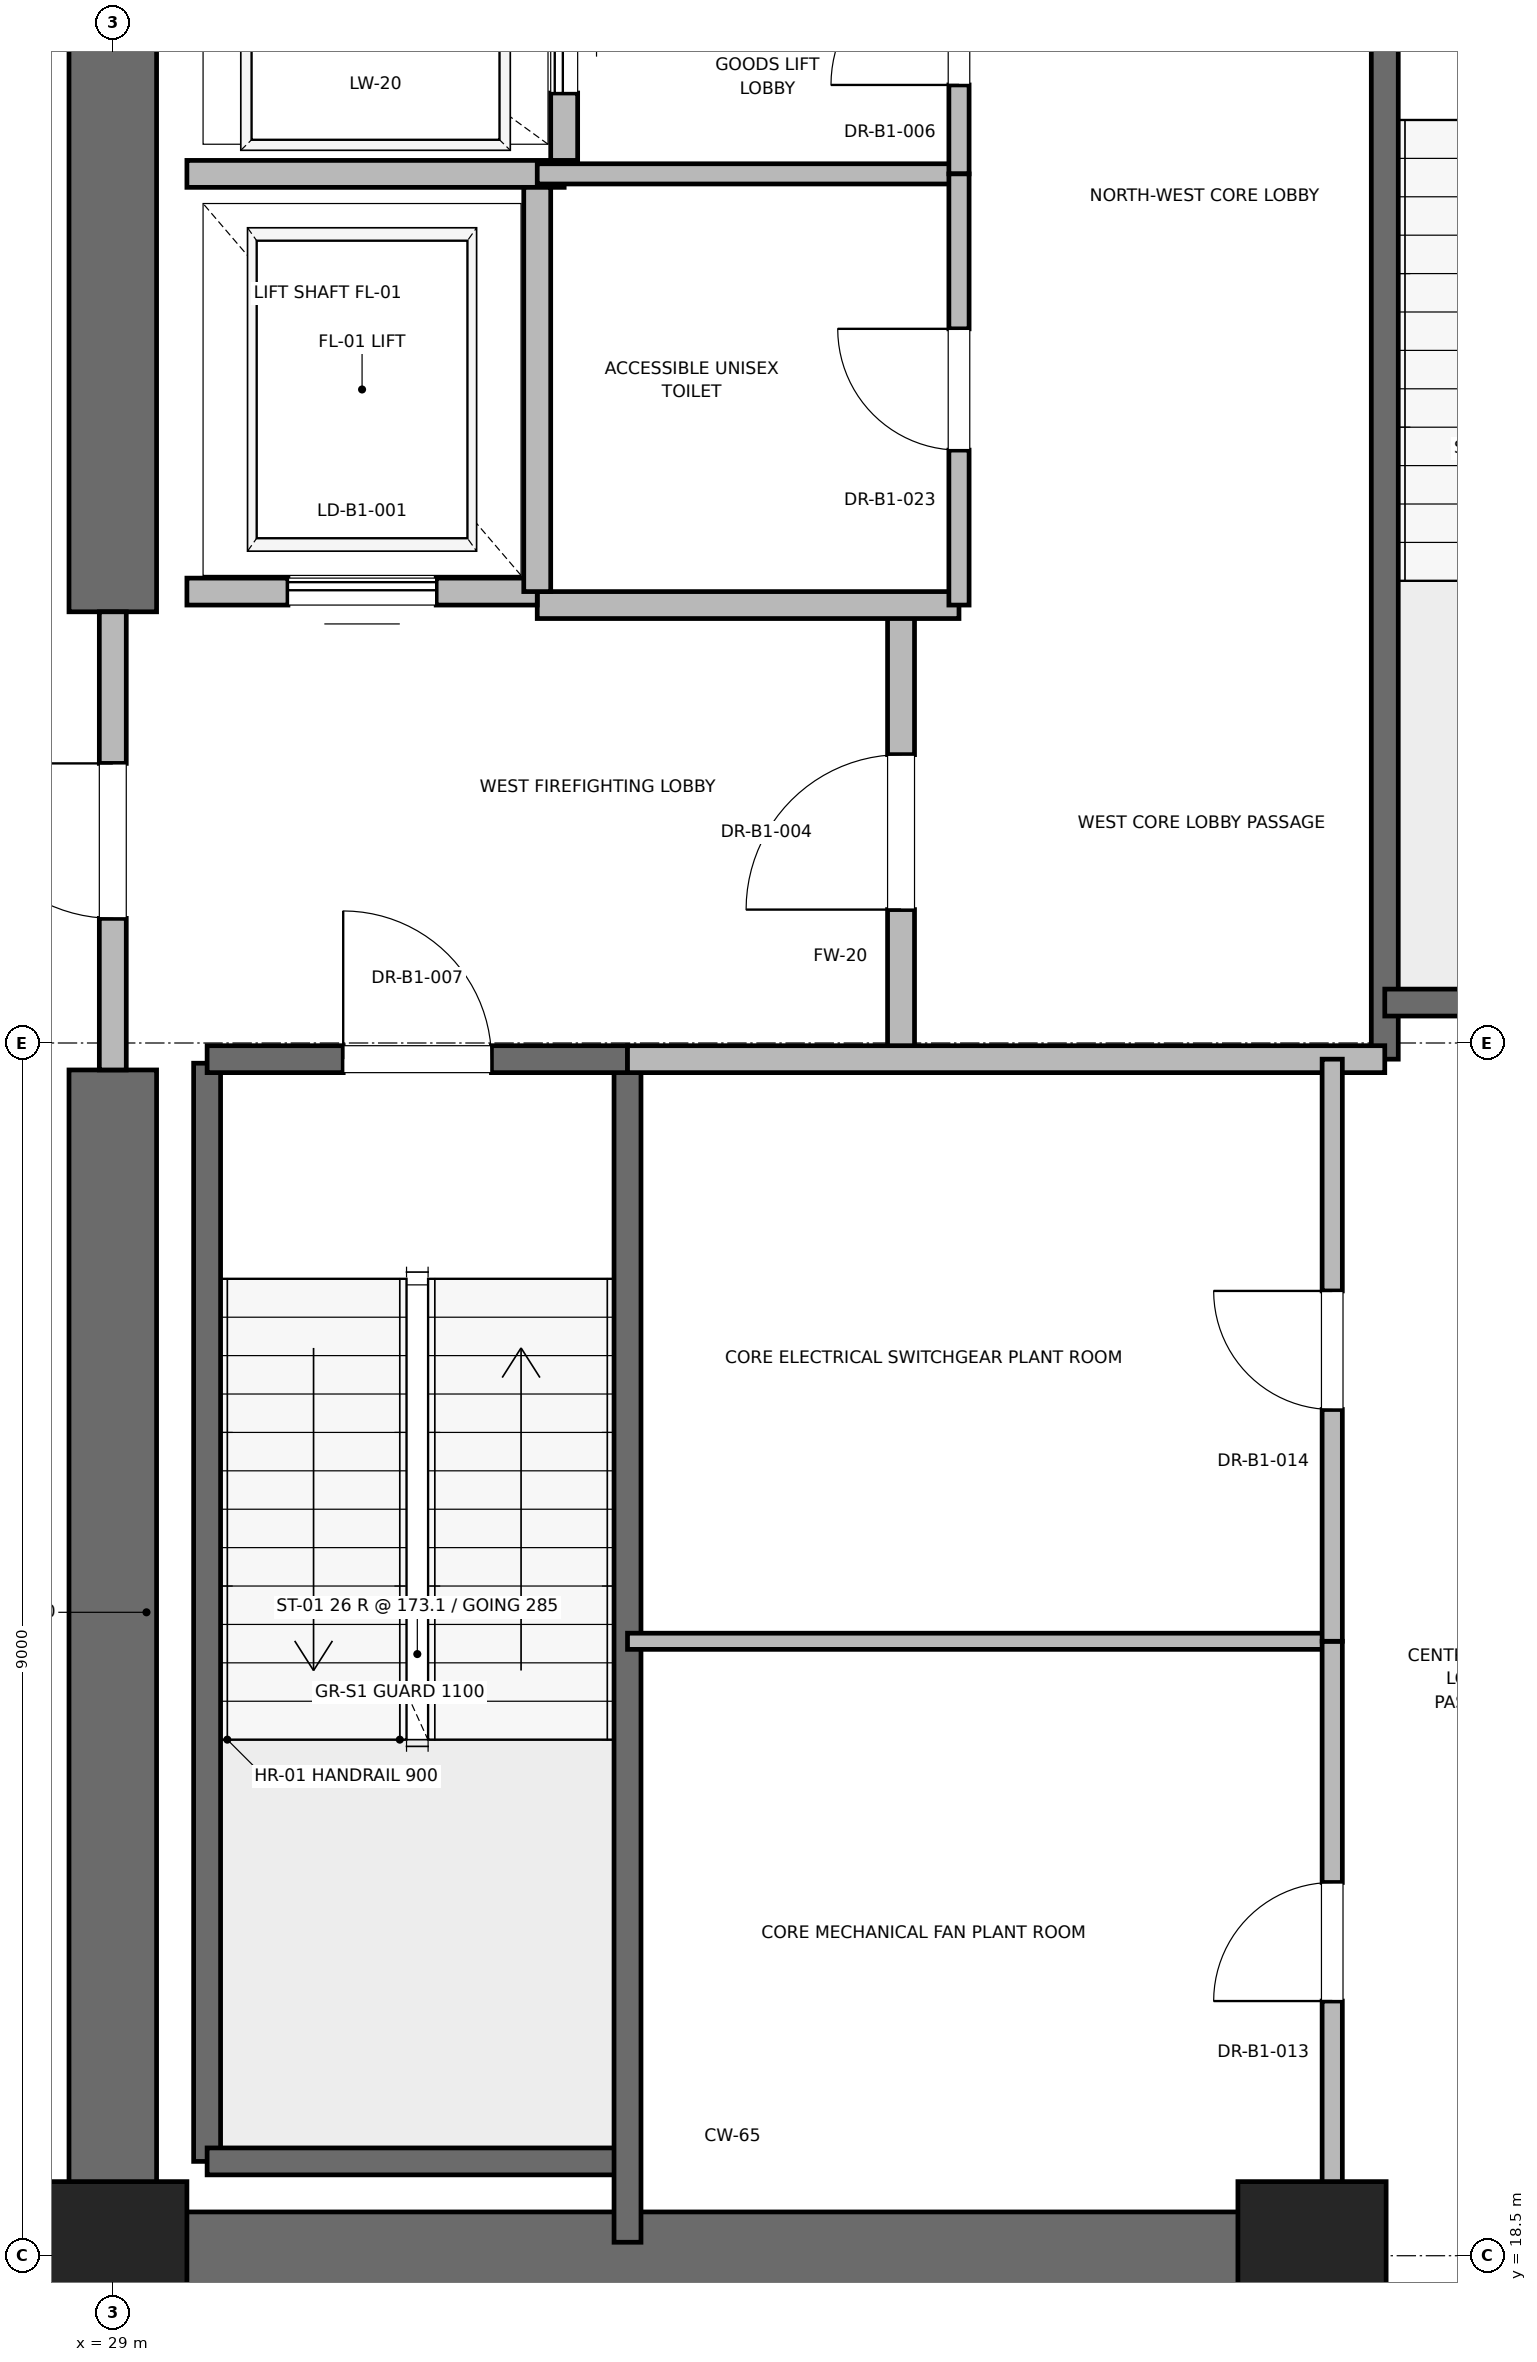
"""IFC4 building model, lengths in metres.
Left out: names, types, materials, properties, quantities, classifications, styles, units other than length and angle.
Written with IfcOpenShell. Run it as: python <this file> out.ifc"""

import sys

from ifc_helpers import new_model, si_unit, direction, frame, frame_2d, origin, origin_2d, place, context, subcontext, project, spatial, rectangle, extrude, element, fill, save


model = new_model("IFC4")
c1 = context("Model", 3, precision=1e-05, world=origin(), true_north=direction((0.0, 1.0)))
c2 = subcontext(c1, "Body", "Model", "MODEL_VIEW")
j1 = project(units=[si_unit("LENGTHUNIT", "METRE"), si_unit("PLANEANGLEUNIT", "RADIAN")], contexts=[c1])
p1 = place(None, origin())
s1 = spatial("IfcSite", under=j1, at=p1, CompositionType="ELEMENT")
p2 = place(p1, origin())
s2 = spatial("IfcBuilding", under=s1, at=p2, CompositionType="ELEMENT")
p3 = place(p2, frame((0.0, 0.0, -4.5)))
s3 = spatial("IfcBuildingStorey", under=s2, at=p3, CompositionType="ELEMENT", Elevation=-4.5)
for number, where, z_axis, x_axis in (
    (1, (29.0, 18.5, 0.0), (0.0, 0.0, 1.0), (1.0, 0.0, 0.0)),
    (2, (37.9, 18.5, 0.0), (0.0, 0.0, 1.0), (1.0, 0.0, 0.0)),
):
    element("IfcColumn", number, at=place(p3, frame(where, z_axis=z_axis, x_axis=x_axis)), inside=s3, PredefinedType="PILASTER", context=c2, shape_type="SweptSolid", body=[
        extrude(rectangle(XDim=1.1, YDim=1.1, at=origin_2d()), origin(), (0.0, 0.0, 1.0), 4.5),
    ])
p4 = place(p3, frame((29.0, 18.5, 0.0), z_axis=(0.0, 0.0, 1.0), x_axis=(1.0, 0.0, 0.0)))
e3 = element("IfcWall", 3, at=p4, inside=s3, PredefinedType="SHEAR", context=c2, shape_type="SweptSolid", body=[
    extrude(rectangle(XDim=9.2, YDim=0.65, at=frame_2d((4.6, 0.0))), origin(), (0.0, 0.0, 1.0), 4.22),
])
p5 = place(p3, frame((29.0, 18.5, 0.0), z_axis=(0.0, 0.0, 1.0), x_axis=(0.0, 1.0, 0.0)))
e4 = element("IfcWall", 4, at=p5, inside=s3, PredefinedType="SHEAR", context=c2, shape_type="SweptSolid", body=[
    extrude(rectangle(XDim=8.8, YDim=0.65, at=frame_2d((4.4, 0.0))), origin(), (0.0, 0.0, 1.0), 4.22),
])
p6 = place(p3, frame((29.0, 30.7, 0.0), z_axis=(0.0, 0.0, 1.0), x_axis=(0.0, 1.0, 0.0)))
e5 = element("IfcWall", 5, at=p6, inside=s3, PredefinedType="SHEAR", context=c2, shape_type="SweptSolid", body=[
    extrude(rectangle(XDim=5.8, YDim=0.65, at=frame_2d((2.9, 0.0))), origin(), (0.0, 0.0, 1.0), 4.22),
])
p7 = place(p3, frame((29.7, 19.2, 0.0), z_axis=(0.0, 0.0, 1.0), x_axis=(0.0, 1.0, 0.0)))
e6 = element("IfcWall", 6, at=p7, inside=s3, PredefinedType="SOLIDWALL", context=c2, shape_type="SweptSolid", body=[
    extrude(rectangle(XDim=8.15, YDim=0.2, at=frame_2d((4.075, 0.0))), origin(), (0.0, 0.0, 1.0), 4.22),
])
p8 = place(p3, frame((29.7, 19.2, 0.0), z_axis=(0.0, 0.0, 1.0), x_axis=(1.0, 0.0, 0.0)))
e7 = element("IfcWall", 7, at=p8, inside=s3, PredefinedType="SOLIDWALL", context=c2, shape_type="SweptSolid", body=[
    extrude(rectangle(XDim=3.12, YDim=0.2, at=frame_2d((1.56, 0.0))), origin(), (0.0, 0.0, 1.0), 4.22),
])
p9 = place(p3, frame((32.82, 18.6, 0.0), z_axis=(0.0, 0.0, 1.0), x_axis=(0.0, 1.0, 0.0)))
e8 = element("IfcWall", 8, at=p9, inside=s3, PredefinedType="SOLIDWALL", context=c2, shape_type="SweptSolid", body=[
    extrude(rectangle(XDim=8.78, YDim=0.2, at=frame_2d((4.39, 0.0))), origin(), (0.0, 0.0, 1.0), 4.22),
])
p10 = place(p3, frame((29.7, 27.38, 0.0), z_axis=(0.0, 0.0, 1.0), x_axis=(1.0, 0.0, 0.0)))
e9 = element("IfcWall", 9, at=p10, inside=s3, PredefinedType="SOLIDWALL", context=c2, shape_type="SweptSolid", body=[
    extrude(rectangle(XDim=3.12, YDim=0.2, at=frame_2d((1.56, 0.0))), origin(), (0.0, 0.0, 1.0), 4.22),
])
p11 = place(p10, frame((1.01, 0.0, 0.0)))
e10 = element("IfcOpeningElement", 10, at=p11, cuts=e9, PredefinedType="OPENING", context=c2, shape_type="SweptSolid", body=[
    extrude(rectangle(XDim=1.1, YDim=2.15, at=frame_2d((0.55, 1.075))), frame((0.0, 0.1, 0.0), z_axis=(0.0, -1.0, 0.0), x_axis=(1.0, 0.0, 0.0)), (0.0, 0.0, 1.0), 0.2),
])
p12 = place(p3, frame((38.44, 27.38, 0.0), z_axis=(0.0, 0.0, 1.0), x_axis=(0.0, 1.0, 0.0)))
e11 = element("IfcWall", 11, at=p12, inside=s3, PredefinedType="SOLIDWALL", context=c2, shape_type="SweptSolid", body=[
    extrude(rectangle(XDim=8.87, YDim=0.2, at=frame_2d((4.435, 0.0))), origin(), (0.0, 0.0, 1.0), 4.22),
])
p13 = place(p3, frame((38.44, 27.8, 0.0), z_axis=(0.0, 0.0, 1.0), x_axis=(1.0, 0.0, 0.0)))
e12 = element("IfcWall", 12, at=p13, inside=s3, PredefinedType="SOLIDWALL", context=c2, shape_type="SweptSolid", body=[
    extrude(rectangle(XDim=3.32, YDim=0.2, at=frame_2d((1.66, 0.0))), origin(), (0.0, 0.0, 1.0), 4.22),
])
p14 = place(p3, frame((34.85, 27.38, 0.0), z_axis=(0.0, 0.0, 1.0), x_axis=(0.0, 1.0, 0.0)))
e13 = element("IfcWall", 13, at=p14, inside=s3, PredefinedType="PARTITIONING", context=c2, shape_type="SweptSolid", body=[
    extrude(rectangle(XDim=3.37, YDim=0.2, at=frame_2d((1.685, 0.0))), origin(), (0.0, 0.0, 1.0), 4.22),
])
p15 = place(p14, frame((1.11, 0.0, 0.0)))
e14 = element("IfcOpeningElement", 14, at=p15, cuts=e13, PredefinedType="OPENING", context=c2, shape_type="SweptSolid", body=[
    extrude(rectangle(XDim=1.15, YDim=2.2, at=frame_2d((0.575, 1.1))), frame((0.0, 0.1, 0.0), z_axis=(0.0, -1.0, 0.0), x_axis=(1.0, 0.0, 0.0)), (0.0, 0.0, 1.0), 0.2),
])
p16 = place(p3, frame((29.0, 27.3, 0.0), z_axis=(0.0, 0.0, 1.0), x_axis=(0.0, 1.0, 0.0)))
e15 = element("IfcWall", 15, at=p16, inside=s3, PredefinedType="PARTITIONING", context=c2, shape_type="SweptSolid", body=[
    extrude(rectangle(XDim=3.4, YDim=0.2, at=frame_2d((1.7, 0.0))), origin(), (0.0, 0.0, 1.0), 3.0),
])
p17 = place(p16, frame((1.125, 0.0, 0.0)))
e16 = element("IfcOpeningElement", 16, at=p17, cuts=e15, PredefinedType="OPENING", context=c2, shape_type="SweptSolid", body=[
    extrude(rectangle(XDim=1.15, YDim=2.2, at=frame_2d((0.575, 1.1))), frame((0.0, 0.1, 0.0), z_axis=(0.0, -1.0, 0.0), x_axis=(1.0, 0.0, 0.0)), (0.0, 0.0, 1.0), 0.2),
])
p18 = place(p3, frame((32.82, 27.38, 0.0), z_axis=(0.0, 0.0, 1.0), x_axis=(1.0, 0.0, 0.0)))
e17 = element("IfcWall", 17, at=p18, inside=s3, PredefinedType="PARTITIONING", context=c2, shape_type="SweptSolid", body=[
    extrude(rectangle(XDim=5.62, YDim=0.2, at=frame_2d((2.81, 0.0))), origin(), (0.0, 0.0, 1.0), 4.22),
])
p19 = place(p3, frame((32.15, 30.75, 0.0), z_axis=(0.0, 0.0, 1.0), x_axis=(1.0, 0.0, 0.0)))
e18 = element("IfcWall", 18, at=p19, inside=s3, PredefinedType="PARTITIONING", context=c2, shape_type="SweptSolid", body=[
    extrude(rectangle(XDim=3.13, YDim=0.2, at=frame_2d((1.565, 0.0))), origin(), (0.0, 0.0, 1.0), 4.22),
])
p20 = place(p3, frame((29.55, 30.85, 0.0), z_axis=(0.0, 0.0, 1.0), x_axis=(1.0, 0.0, 0.0)))
e19 = element("IfcWall", 19, at=p20, inside=s3, PredefinedType="SOLIDWALL", context=c2, shape_type="SweptSolid", body=[
    extrude(rectangle(XDim=2.6, YDim=0.2, at=frame_2d((1.3, 0.0))), origin(), (0.0, 0.0, 1.0), 3.0),
])
p21 = place(p20, frame((0.75, 0.0, 0.0)))
e20 = element("IfcOpeningElement", 20, at=p21, cuts=e19, PredefinedType="OPENING", context=c2, shape_type="SweptSolid", body=[
    extrude(rectangle(XDim=1.1, YDim=2.2, at=frame_2d((0.55, 1.1))), frame((0.0, 0.1, 0.0), z_axis=(0.0, -1.0, 0.0), x_axis=(1.0, 0.0, 0.0)), (0.0, 0.0, 1.0), 0.2),
])
p22 = place(p3, frame((29.55, 33.95, 0.0), z_axis=(0.0, 0.0, 1.0), x_axis=(1.0, 0.0, 0.0)))
e21 = element("IfcWall", 21, at=p22, inside=s3, PredefinedType="SOLIDWALL", context=c2, shape_type="SweptSolid", body=[
    extrude(rectangle(XDim=2.8, YDim=0.2, at=frame_2d((1.4, 0.0))), origin(), (0.0, 0.0, 1.0), 4.22),
])
p23 = place(p3, frame((32.15, 30.85, 0.0), z_axis=(0.0, 0.0, 1.0), x_axis=(0.0, 1.0, 0.0)))
e22 = element("IfcWall", 22, at=p23, inside=s3, PredefinedType="SOLIDWALL", context=c2, shape_type="SweptSolid", body=[
    extrude(rectangle(XDim=3.0, YDim=0.2, at=frame_2d((1.5, 0.0))), origin(), (0.0, 0.0, 1.0), 4.22),
])
p24 = place(p3, frame((32.35, 34.05, 0.0), z_axis=(0.0, 0.0, 1.0), x_axis=(0.0, 1.0, 0.0)))
e23 = element("IfcWall", 23, at=p24, inside=s3, PredefinedType="SOLIDWALL", context=c2, shape_type="SweptSolid", body=[
    extrude(rectangle(XDim=2.1, YDim=0.2, at=frame_2d((1.05, 0.0))), origin(), (0.0, 0.0, 1.0), 4.22),
])
p25 = place(p24, frame((0.5, 0.0, 0.0)))
e24 = element("IfcOpeningElement", 24, at=p25, cuts=e23, PredefinedType="OPENING", context=c2, shape_type="SweptSolid", body=[
    extrude(rectangle(XDim=1.1, YDim=2.2, at=frame_2d((0.55, 1.1))), frame((0.0, 0.1, 0.0), z_axis=(0.0, -1.0, 0.0), x_axis=(1.0, 0.0, 0.0)), (0.0, 0.0, 1.0), 0.2),
])
p26 = place(p3, frame((32.15, 33.95, 0.0), z_axis=(0.0, 0.0, 1.0), x_axis=(1.0, 0.0, 0.0)))
e25 = element("IfcWall", 25, at=p26, inside=s3, PredefinedType="PARTITIONING", context=c2, shape_type="SweptSolid", body=[
    extrude(rectangle(XDim=3.13, YDim=0.15, at=frame_2d((1.565, 0.0))), origin(), (0.0, 0.0, 1.0), 2.85),
])
p27 = place(p3, frame((35.28, 33.95, 0.0), z_axis=(0.0, 0.0, 1.0), x_axis=(0.0, 1.0, 0.0)))
e26 = element("IfcWall", 26, at=p27, inside=s3, PredefinedType="PARTITIONING", context=c2, shape_type="SweptSolid", body=[
    extrude(rectangle(XDim=2.27, YDim=0.15, at=frame_2d((1.135, 0.0))), origin(), (0.0, 0.0, 1.0), 2.85),
])
p28 = place(p27, frame((0.66, 0.0, 0.0)))
e27 = element("IfcOpeningElement", 27, at=p28, cuts=e26, PredefinedType="OPENING", context=c2, shape_type="SweptSolid", body=[
    extrude(rectangle(XDim=0.95, YDim=2.15, at=frame_2d((0.475, 1.075))), frame((0.0, 0.075, 0.0), z_axis=(0.0, -1.0, 0.0), x_axis=(1.0, 0.0, 0.0)), (0.0, 0.0, 1.0), 0.15),
])
p29 = place(p3, frame((35.28, 30.75, 0.0), z_axis=(0.0, 0.0, 1.0), x_axis=(0.0, 1.0, 0.0)))
e28 = element("IfcWall", 28, at=p29, inside=s3, PredefinedType="PARTITIONING", context=c2, shape_type="SweptSolid", body=[
    extrude(rectangle(XDim=3.2, YDim=0.15, at=frame_2d((1.6, 0.0))), origin(), (0.0, 0.0, 1.0), 2.85),
])
p30 = place(p29, frame((1.15, 0.0, 0.0)))
e29 = element("IfcOpeningElement", 29, at=p30, cuts=e28, PredefinedType="OPENING", context=c2, shape_type="SweptSolid", body=[
    extrude(rectangle(XDim=0.9, YDim=2.1, at=frame_2d((0.45, 1.05))), frame((0.0, 0.075, 0.0), z_axis=(0.0, -1.0, 0.0), x_axis=(1.0, 0.0, 0.0)), (0.0, 0.0, 1.0), 0.15),
])
p31 = place(p3, frame((32.82, 23.06, 0.0), z_axis=(0.0, 0.0, 1.0), x_axis=(1.0, 0.0, 0.0)))
e30 = element("IfcWall", 30, at=p31, inside=s3, PredefinedType="PARTITIONING", context=c2, shape_type="SweptSolid", body=[
    extrude(rectangle(XDim=5.23, YDim=0.12, at=frame_2d((2.615, 0.0))), origin(), (0.0, 0.0, 1.0), 2.85),
])
p32 = place(p3, frame((38.05, 18.6, 0.0), z_axis=(0.0, 0.0, 1.0), x_axis=(0.0, 1.0, 0.0)))
e31 = element("IfcWall", 31, at=p32, inside=s3, PredefinedType="PARTITIONING", context=c2, shape_type="SweptSolid", body=[
    extrude(rectangle(XDim=4.46, YDim=0.15, at=frame_2d((2.23, 0.0))), origin(), (0.0, 0.0, 1.0), 2.85),
])
p33 = place(p32, frame((1.79, 0.0, 0.0)))
e32 = element("IfcOpeningElement", 32, at=p33, cuts=e31, PredefinedType="OPENING", context=c2, shape_type="SweptSolid", body=[
    extrude(rectangle(XDim=0.88, YDim=2.1, at=frame_2d((0.44, 1.05))), frame((0.0, 0.075, 0.0), z_axis=(0.0, -1.0, 0.0), x_axis=(1.0, 0.0, 0.0)), (0.0, 0.0, 1.0), 0.15),
])
p34 = place(p3, frame((38.05, 23.06, 0.0), z_axis=(0.0, 0.0, 1.0), x_axis=(0.0, 1.0, 0.0)))
e33 = element("IfcWall", 33, at=p34, inside=s3, PredefinedType="PARTITIONING", context=c2, shape_type="SweptSolid", body=[
    extrude(rectangle(XDim=4.32, YDim=0.15, at=frame_2d((2.16, 0.0))), origin(), (0.0, 0.0, 1.0), 2.85),
])
p35 = place(p34, frame((1.72, 0.0, 0.0)))
e34 = element("IfcOpeningElement", 34, at=p35, cuts=e33, PredefinedType="OPENING", context=c2, shape_type="SweptSolid", body=[
    extrude(rectangle(XDim=0.88, YDim=2.1, at=frame_2d((0.44, 1.05))), frame((0.0, 0.075, 0.0), z_axis=(0.0, -1.0, 0.0), x_axis=(1.0, 0.0, 0.0)), (0.0, 0.0, 1.0), 0.15),
])
p36 = place(p11, origin())
e35 = element("IfcDoor", 35, at=p36, inside=s3, OperationType="SINGLE_SWING_LEFT", PredefinedType="DOOR", context=c2, shape_type="SweptSolid", body=[
    extrude(rectangle(XDim=1.1, YDim=2.15, at=frame_2d((0.55, 1.075))), frame((0.0, 0.025, 0.0), z_axis=(0.0, -1.0, 0.0), x_axis=(1.0, 0.0, 0.0)), (0.0, 0.0, 1.0), 0.05),
])
fill(e10, e35)
p37 = place(p15, origin())
e36 = element("IfcDoor", 36, at=p37, inside=s3, OperationType="SINGLE_SWING_LEFT", PredefinedType="DOOR", context=c2, shape_type="SweptSolid", body=[
    extrude(rectangle(XDim=1.15, YDim=2.2, at=frame_2d((0.575, 1.1))), frame((0.0, 0.025, 0.0), z_axis=(0.0, -1.0, 0.0), x_axis=(1.0, 0.0, 0.0)), (0.0, 0.0, 1.0), 0.05),
])
fill(e14, e36)
p38 = place(p17, origin())
e37 = element("IfcDoor", 37, at=p38, inside=s3, OperationType="SINGLE_SWING_RIGHT", PredefinedType="DOOR", context=c2, shape_type="SweptSolid", body=[
    extrude(rectangle(XDim=1.15, YDim=2.2, at=frame_2d((0.575, 1.1))), frame((0.0, 0.025, 0.0), z_axis=(0.0, -1.0, 0.0), x_axis=(1.0, 0.0, 0.0)), (0.0, 0.0, 1.0), 0.05),
])
fill(e16, e37)
p39 = place(p21, origin())
e38 = element("IfcDoor", 38, at=p39, inside=s3, OperationType="SLIDING_TO_RIGHT", PredefinedType="DOOR", context=c2, shape_type="SweptSolid", body=[
    extrude(rectangle(XDim=1.1, YDim=2.2, at=frame_2d((0.55, 1.1))), frame((0.0, 0.025, 0.0), z_axis=(0.0, -1.0, 0.0), x_axis=(1.0, 0.0, 0.0)), (0.0, 0.0, 1.0), 0.05),
])
fill(e20, e38)
p40 = place(p25, origin())
e39 = element("IfcDoor", 39, at=p40, inside=s3, OperationType="SLIDING_TO_RIGHT", PredefinedType="DOOR", context=c2, shape_type="SweptSolid", body=[
    extrude(rectangle(XDim=1.1, YDim=2.2, at=frame_2d((0.55, 1.1))), frame((0.0, 0.025, 0.0), z_axis=(0.0, -1.0, 0.0), x_axis=(1.0, 0.0, 0.0)), (0.0, 0.0, 1.0), 0.05),
])
fill(e24, e39)
p41 = place(p28, origin())
e40 = element("IfcDoor", 40, at=p41, inside=s3, OperationType="SINGLE_SWING_LEFT", PredefinedType="DOOR", context=c2, shape_type="SweptSolid", body=[
    extrude(rectangle(XDim=0.95, YDim=2.15, at=frame_2d((0.475, 1.075))), frame((0.0, 0.025, 0.0), z_axis=(0.0, -1.0, 0.0), x_axis=(1.0, 0.0, 0.0)), (0.0, 0.0, 1.0), 0.05),
])
fill(e27, e40)
p42 = place(p30, origin())
e41 = element("IfcDoor", 41, at=p42, inside=s3, OperationType="SINGLE_SWING_RIGHT", PredefinedType="DOOR", context=c2, shape_type="SweptSolid", body=[
    extrude(rectangle(XDim=0.9, YDim=2.1, at=frame_2d((0.45, 1.05))), frame((0.0, 0.025, 0.0), z_axis=(0.0, -1.0, 0.0), x_axis=(1.0, 0.0, 0.0)), (0.0, 0.0, 1.0), 0.05),
])
fill(e29, e41)
p43 = place(p33, origin())
e42 = element("IfcDoor", 42, at=p43, inside=s3, OperationType="SINGLE_SWING_LEFT", PredefinedType="DOOR", context=c2, shape_type="SweptSolid", body=[
    extrude(rectangle(XDim=0.88, YDim=2.1, at=frame_2d((0.44, 1.05))), frame((0.0, 0.025, 0.0), z_axis=(0.0, -1.0, 0.0), x_axis=(1.0, 0.0, 0.0)), (0.0, 0.0, 1.0), 0.05),
])
fill(e32, e42)
p44 = place(p35, origin())
e43 = element("IfcDoor", 43, at=p44, inside=s3, OperationType="SINGLE_SWING_RIGHT", PredefinedType="DOOR", context=c2, shape_type="SweptSolid", body=[
    extrude(rectangle(XDim=0.88, YDim=2.1, at=frame_2d((0.44, 1.05))), frame((0.0, 0.025, 0.0), z_axis=(0.0, -1.0, 0.0), x_axis=(1.0, 0.0, 0.0)), (0.0, 0.0, 1.0), 0.05),
])
fill(e34, e43)
save(model, sys.argv[1])
